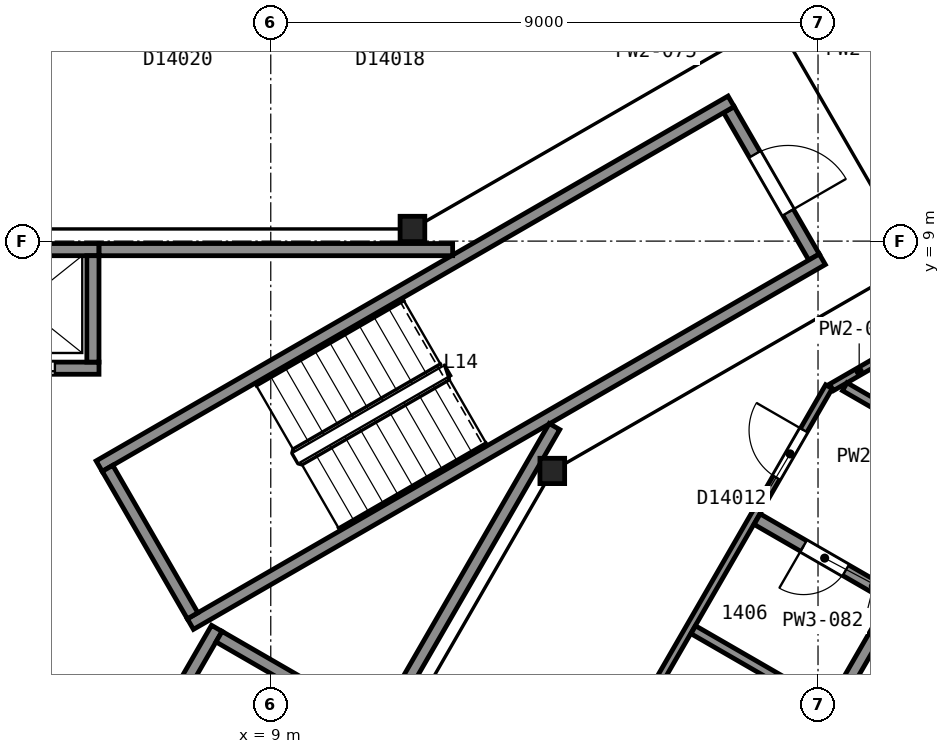
"""IFC4 building model, lengths in metres.
Left out: names, types, materials, properties, quantities, classifications, styles, units other than length and angle.
Written with IfcOpenShell. Run it as: python <this file> out.ifc"""

import sys

from ifc_helpers import new_model, si_unit, direction, frame, frame_2d, origin, origin_2d, place, context, subcontext, project, spatial, rectangle, i_section, extrude, element, fill, save


model = new_model("IFC4")
c1 = context("Model", 3, precision=1e-05, world=origin(), true_north=direction((0.0, 1.0)))
c2 = subcontext(c1, "Body", "Model", "MODEL_VIEW")
j1 = project(units=[si_unit("LENGTHUNIT", "METRE"), si_unit("PLANEANGLEUNIT", "RADIAN")], contexts=[c1])
p1 = place(None, origin())
s1 = spatial("IfcSite", under=j1, at=p1, CompositionType="ELEMENT")
p2 = place(p1, origin())
s2 = spatial("IfcBuilding", under=s1, at=p2, CompositionType="ELEMENT")
p3 = place(p2, frame((0.0, 0.0, 65.6)))
s3 = spatial("IfcBuildingStorey", under=s2, at=p3, CompositionType="ELEMENT", Elevation=65.6)
for number, where, z_axis, x_axis in (
    (1, (13.63, 5.22, 0.0), (0.0, 0.0, 1.0), (1.0, 0.0, 0.0)),
    (2, (11.33, 9.2, 0.0), (0.0, 0.0, 1.0), (1.0, 0.0, 0.0)),
):
    element("IfcColumn", number, at=place(p3, frame(where, z_axis=z_axis, x_axis=x_axis)), inside=s3, PredefinedType="COLUMN", context=c2, shape_type="SweptSolid", body=[
        extrude(i_section(OverallWidth=0.406, OverallDepth=0.417, WebThickness=0.03, FlangeThickness=0.048, FilletRadius=0.015, at=origin_2d()), origin(), (0.0, 0.0, 1.0), 3.6),
    ])
p4 = place(p3, frame((17.934, 8.738, 0.0), z_axis=(0.0, 0.0, 1.0), x_axis=(-0.49998411664, 0.866034573852, 0.0)))
e3 = element("IfcWall", 3, at=p4, inside=s3, PredefinedType="PARTITIONING", context=c2, shape_type="SweptSolid", body=[
    extrude(rectangle(XDim=2.8, YDim=0.2, at=frame_2d((1.4, 0.0))), origin(), (0.0, 0.0, 1.0), 3.35),
])
p5 = place(p4, frame((0.85, 0.0, 0.0)))
e4 = element("IfcOpeningElement", 4, at=p5, cuts=e3, PredefinedType="OPENING", context=c2, shape_type="SweptSolid", body=[
    extrude(rectangle(XDim=1.1, YDim=2.1, at=frame_2d((0.55, 1.05))), frame((0.0, 0.11, 0.0), z_axis=(0.0, -1.0, 0.0), x_axis=(1.0, 0.0, 0.0)), (0.0, 0.0, 1.0), 0.22),
])
for number, where, z_axis, x_axis in (
    (5, (6.178, 5.299, 0.0), (0.0, 0.0, 1.0), (0.866, 0.5, 0.0)),
    (6, (7.678, 2.701, 0.0), (0.0, 0.0, 1.0), (0.866, 0.5, 0.0)),
):
    element("IfcWall", number, at=place(p3, frame(where, z_axis=z_axis, x_axis=x_axis)), inside=s3, PredefinedType="PARTITIONING", context=c2, shape_type="SweptSolid", body=[
        extrude(rectangle(XDim=12.0, YDim=0.2, at=frame_2d((6.0, 0.0))), origin(), (0.0, 0.0, 1.0), 3.35),
    ])
p6 = place(p3, frame((7.715, 2.838, 0.0), z_axis=(0.0, 0.0, 1.0), x_axis=(-0.500049511043, 0.865996816683, 0.0)))
e7 = element("IfcWall", 7, at=p6, inside=s3, PredefinedType="PARTITIONING", context=c2, shape_type="SweptSolid", body=[
    extrude(rectangle(XDim=2.8, YDim=0.2, at=frame_2d((1.4, 0.0))), origin(), (0.0, 0.0, 1.0), 3.35),
])
p7 = place(p3, frame((3.625, 6.91, 0.0), z_axis=(0.0, 0.0, 1.0), x_axis=(1.0, 0.0, 0.0)))
e8 = element("IfcWall", 8, at=p7, inside=s3, PredefinedType="PARTITIONING", context=c2, shape_type="SweptSolid", body=[
    extrude(rectangle(XDim=2.55, YDim=0.2, at=frame_2d((1.275, 0.0))), origin(), (0.0, 0.0, 1.0), 3.6),
])
p8 = place(p7, frame((0.725, 0.0, 0.0)))
e9 = element("IfcOpeningElement", 9, at=p8, cuts=e8, PredefinedType="OPENING", context=c2, shape_type="SweptSolid", body=[
    extrude(rectangle(XDim=1.1, YDim=2.1, at=frame_2d((0.55, 1.05))), frame((0.0, 0.11, 0.0), z_axis=(0.0, -1.0, 0.0), x_axis=(1.0, 0.0, 0.0)), (0.0, 0.0, 1.0), 0.22),
])
p9 = place(p3, frame((3.625, 8.86, 0.0), z_axis=(0.0, 0.0, 1.0), x_axis=(1.0, 0.0, 0.0)))
e10 = element("IfcWall", 10, at=p9, inside=s3, PredefinedType="PARTITIONING", context=c2, shape_type="SweptSolid", body=[
    extrude(rectangle(XDim=2.55, YDim=0.2, at=frame_2d((1.275, 0.0))), origin(), (0.0, 0.0, 1.0), 3.6),
])
p10 = place(p3, frame((5.663, -1.612, 0.0), z_axis=(0.0, 0.0, 1.0), x_axis=(0.49998122708, 0.866036242063, 0.0)))
e11 = element("IfcWall", 11, at=p10, inside=s3, PredefinedType="PARTITIONING", context=c2, shape_type="SweptSolid", body=[
    extrude(rectangle(XDim=4.9, YDim=0.2, at=frame_2d((2.45, 0.0))), origin(), (0.0, 0.0, 1.0), 3.6),
])
p11 = place(p3, frame((6.075, 7.01, 0.0), z_axis=(0.0, 0.0, 1.0), x_axis=(0.0, 1.0, 0.0)))
e12 = element("IfcWall", 12, at=p11, inside=s3, PredefinedType="PARTITIONING", context=c2, shape_type="SweptSolid", body=[
    extrude(rectangle(XDim=1.75, YDim=0.2, at=frame_2d((0.875, 0.0))), origin(), (0.0, 0.0, 1.0), 3.6),
])
p12 = place(p3, frame((9.665, 1.62, 0.0), z_axis=(0.0, 0.0, 1.0), x_axis=(-0.866002029911, 0.500040482552, 0.0)))
e13 = element("IfcWall", 13, at=p12, inside=s3, PredefinedType="PARTITIONING", context=c2, shape_type="SweptSolid", body=[
    extrude(rectangle(XDim=1.75, YDim=0.2, at=frame_2d((0.875, 0.0))), origin(), (0.0, 0.0, 1.0), 3.6),
])
p13 = place(p3, frame((6.177, 8.86, 0.0), z_axis=(0.0, 0.0, 1.0), x_axis=(1.0, 0.0, 0.0)))
e14 = element("IfcWall", 14, at=p13, inside=s3, PredefinedType="PARTITIONING", context=c2, shape_type="SweptSolid", body=[
    extrude(rectangle(XDim=5.814, YDim=0.2, at=frame_2d((2.907, 0.0))), origin(), (0.0, 0.0, 1.0), 3.35),
])
p14 = place(p3, frame((8.492, -3.012, 0.0), z_axis=(0.0, 0.0, 1.0), x_axis=(0.499972957231, 0.866041016371, 0.0)))
e15 = element("IfcWall", 15, at=p14, inside=s3, PredefinedType="PARTITIONING", context=c2, shape_type="SweptSolid", body=[
    extrude(rectangle(XDim=10.349, YDim=0.2, at=frame_2d((5.174, 0.0))), origin(), (0.0, 0.0, 1.0), 3.35),
])
p15 = place(p3, frame((18.179, 6.606, 0.0), z_axis=(0.0, 0.0, 1.0), x_axis=(-0.500003973642, -0.866023109589, 0.0)))
e16 = element("IfcWall", 16, at=p15, inside=s3, PredefinedType="PARTITIONING", context=c2, shape_type="SweptSolid", body=[
    extrude(rectangle(XDim=28.826, YDim=0.125, at=frame_2d((14.413, 0.0))), origin(), (0.0, 0.0, 1.0), 2.613),
])
p16 = place(p15, frame((21.501, 0.0, 0.0)))
e17 = element("IfcOpeningElement", 17, at=p16, cuts=e16, PredefinedType="OPENING", context=c2, shape_type="SweptSolid", body=[
    extrude(rectangle(XDim=0.9, YDim=2.1, at=frame_2d((0.45, 1.05))), frame((0.0, 0.073, 0.0), z_axis=(0.0, -1.0, 0.0), x_axis=(1.0, 0.0, 0.0)), (0.0, 0.0, 1.0), 0.145),
])
p17 = place(p15, frame((18.894, 0.0, 0.0)))
e18 = element("IfcOpeningElement", 18, at=p17, cuts=e16, PredefinedType="OPENING", context=c2, shape_type="SweptSolid", body=[
    extrude(rectangle(XDim=0.9, YDim=2.1, at=frame_2d((0.45, 1.05))), frame((0.0, 0.073, 0.0), z_axis=(0.0, -1.0, 0.0), x_axis=(1.0, 0.0, 0.0)), (0.0, 0.0, 1.0), 0.145),
])
p18 = place(p15, frame((10.937, 0.0, 0.0)))
e19 = element("IfcOpeningElement", 19, at=p18, cuts=e16, PredefinedType="OPENING", context=c2, shape_type="SweptSolid", body=[
    extrude(rectangle(XDim=0.9, YDim=2.1, at=frame_2d((0.45, 1.05))), frame((0.0, 0.073, 0.0), z_axis=(0.0, -1.0, 0.0), x_axis=(1.0, 0.0, 0.0)), (0.0, 0.0, 1.0), 0.145),
])
p19 = place(p15, frame((7.535, 0.0, 0.0)))
e20 = element("IfcOpeningElement", 20, at=p19, cuts=e16, PredefinedType="OPENING", context=c2, shape_type="SweptSolid", body=[
    extrude(rectangle(XDim=0.9, YDim=2.1, at=frame_2d((0.45, 1.05))), frame((0.0, 0.073, 0.0), z_axis=(0.0, -1.0, 0.0), x_axis=(1.0, 0.0, 0.0)), (0.0, 0.0, 1.0), 0.145),
])
p20 = place(p15, frame((0.827, 0.0, 0.0)))
e21 = element("IfcOpeningElement", 21, at=p20, cuts=e16, PredefinedType="OPENING", context=c2, shape_type="SweptSolid", body=[
    extrude(rectangle(XDim=0.9, YDim=2.1, at=frame_2d((0.45, 1.05))), frame((0.0, 0.073, 0.0), z_axis=(0.0, -1.0, 0.0), x_axis=(1.0, 0.0, 0.0)), (0.0, 0.0, 1.0), 0.145),
])
p21 = place(p3, frame((15.948, 2.608, 0.0), z_axis=(0.0, 0.0, 1.0), x_axis=(0.866059124033, -0.499941590267, 0.0)))
e22 = element("IfcWall", 22, at=p21, inside=s3, PredefinedType="PARTITIONING", context=c2, shape_type="SweptSolid", body=[
    extrude(rectangle(XDim=8.487, YDim=0.15, at=frame_2d((4.243, 0.0))), origin(), (0.0, 0.0, 1.0), 2.613),
])
p22 = place(p3, frame((19.366, 3.061, 0.0), z_axis=(0.0, 0.0, 1.0), x_axis=(-0.866102295869, 0.499866795347, 0.0)))
e23 = element("IfcWall", 23, at=p22, inside=s3, PredefinedType="PARTITIONING", context=c2, shape_type="SweptSolid", body=[
    extrude(rectangle(XDim=2.733, YDim=0.2, at=frame_2d((1.367, 0.0))), origin(), (0.0, 0.0, 1.0), 2.613),
])
p23 = place(p22, frame((1.051, 0.0, 0.0)))
e24 = element("IfcOpeningElement", 24, at=p23, cuts=e23, PredefinedType="OPENING", context=c2, shape_type="SweptSolid", body=[
    extrude(rectangle(XDim=0.8, YDim=2.1, at=frame_2d((0.4, 1.05))), frame((0.0, 0.11, 0.0), z_axis=(0.0, -1.0, 0.0), x_axis=(1.0, 0.0, 0.0)), (0.0, 0.0, 1.0), 0.22),
])
p24 = place(p3, frame((18.222, 6.594, 0.0), z_axis=(0.0, 0.0, 1.0), x_axis=(0.865876245925, 0.500258260045, 0.0)))
e25 = element("IfcWall", 25, at=p24, inside=s3, PredefinedType="PARTITIONING", context=c2, shape_type="SweptSolid", body=[
    extrude(rectangle(XDim=1.052, YDim=0.125, at=frame_2d((0.526, 0.0))), origin(), (0.0, 0.0, 1.0), 2.613),
])
p25 = place(p3, frame((18.269, 1.361, 0.0), z_axis=(0.0, 0.0, 1.0), x_axis=(0.499993829411, 0.866028966346, 0.0)))
e26 = element("IfcWall", 26, at=p25, inside=s3, PredefinedType="PARTITIONING", context=c2, shape_type="SweptSolid", body=[
    extrude(rectangle(XDim=1.921, YDim=0.2, at=frame_2d((0.96, 0.0))), origin(), (0.0, 0.0, 1.0), 2.613),
])
p26 = place(p3, frame((18.44, 6.605, 0.0), z_axis=(0.0, 0.0, 1.0), x_axis=(0.866044499518, -0.49996692376, 0.0)))
e27 = element("IfcWall", 27, at=p26, inside=s3, PredefinedType="PARTITIONING", context=c2, shape_type="SweptSolid", body=[
    extrude(rectangle(XDim=8.328, YDim=0.15, at=frame_2d((4.164, 0.0))), origin(), (0.0, 0.0, 1.0), 2.613),
])
p27 = place(p5, origin())
e28 = element("IfcDoor", 28, at=p27, inside=s3, OperationType="SINGLE_SWING_LEFT", PredefinedType="DOOR", context=c2, shape_type="SweptSolid", body=[
    extrude(rectangle(XDim=1.1, YDim=2.1, at=frame_2d((0.55, 1.05))), frame((0.0, 0.025, 0.0), z_axis=(0.0, -1.0, 0.0), x_axis=(1.0, 0.0, 0.0)), (0.0, 0.0, 1.0), 0.05),
])
fill(e4, e28)
p28 = place(p8, origin())
e29 = element("IfcDoor", 29, at=p28, inside=s3, OperationType="SLIDING_TO_LEFT", PredefinedType="DOOR", context=c2, shape_type="SweptSolid", body=[
    extrude(rectangle(XDim=1.1, YDim=2.1, at=frame_2d((0.55, 1.05))), frame((0.0, 0.025, 0.0), z_axis=(0.0, -1.0, 0.0), x_axis=(1.0, 0.0, 0.0)), (0.0, 0.0, 1.0), 0.05),
])
fill(e9, e29)
p29 = place(p20, origin())
e30 = element("IfcDoor", 30, at=p29, inside=s3, OperationType="SINGLE_SWING_LEFT", PredefinedType="DOOR", context=c2, shape_type="SweptSolid", body=[
    extrude(rectangle(XDim=0.9, YDim=2.1, at=frame_2d((0.45, 1.05))), frame((0.0, 0.025, 0.0), z_axis=(0.0, -1.0, 0.0), x_axis=(1.0, 0.0, 0.0)), (0.0, 0.0, 1.0), 0.05),
])
fill(e21, e30)
p30 = place(p23, origin())
e31 = element("IfcDoor", 31, at=p30, inside=s3, OperationType="SINGLE_SWING_RIGHT", PredefinedType="DOOR", context=c2, shape_type="SweptSolid", body=[
    extrude(rectangle(XDim=0.8, YDim=2.1, at=frame_2d((0.4, 1.05))), frame((0.0, 0.025, 0.0), z_axis=(0.0, -1.0, 0.0), x_axis=(1.0, 0.0, 0.0)), (0.0, 0.0, 1.0), 0.05),
])
fill(e24, e31)
save(model, sys.argv[1])
